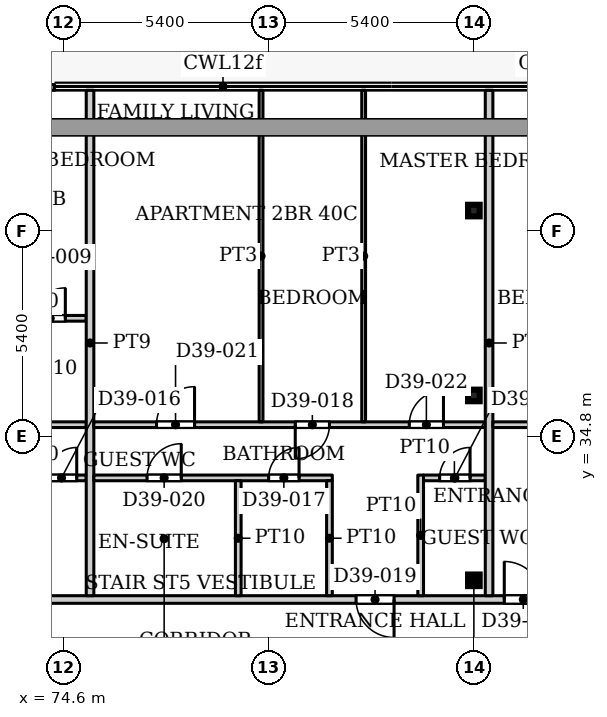
"""IFC4 building model, lengths in metres.
Left out: names, types, materials, properties, quantities, classifications, styles, units other than length and angle.
Written with IfcOpenShell. Run it as: python <this file> out.ifc"""

import sys

from ifc_helpers import new_model, si_unit, direction, frame, frame_2d, origin, origin_2d, place, context, subcontext, project, spatial, rectangle, hollow_rectangle, extrude, source, transform, mapped, element, fill, save


model = new_model("IFC4")
c1 = context("Model", 3, precision=1e-05, world=origin(), true_north=direction((0.0, 1.0)))
c2 = subcontext(c1, "Body", "Model", "MODEL_VIEW")
j1 = project(units=[si_unit("LENGTHUNIT", "METRE"), si_unit("PLANEANGLEUNIT", "RADIAN")], contexts=[c1])
p1 = place(None, origin())
s1 = spatial("IfcSite", under=j1, at=p1, CompositionType="ELEMENT")
p2 = place(p1, origin())
s2 = spatial("IfcBuilding", under=s1, at=p2, CompositionType="ELEMENT")
p3 = place(p2, frame((0.0, 0.0, 172.1)))
s3 = spatial("IfcBuildingStorey", under=s2, at=p3, CompositionType="ELEMENT", Elevation=172.1)
for number, where, z_axis, x_axis in (
    (1, (85.4, 31.005, 0.0), (0.0, 0.0, 1.0), (1.0, 0.0, 0.0)),
    (2, (85.4, 35.87, 0.0), (0.0, 0.0, 1.0), (1.0, 0.0, 0.0)),
    (3, (85.4, 40.735, 0.0), (0.0, 0.0, 1.0), (1.0, 0.0, 0.0)),
):
    element("IfcColumn", number, at=place(p3, frame(where, z_axis=z_axis, x_axis=x_axis)), inside=s3, PredefinedType="COLUMN", context=c2, shape_type="SweptSolid", body=[
        extrude(hollow_rectangle(XDim=0.305, YDim=0.305, WallThickness=0.016, InnerFilletRadius=0.016, OuterFilletRadius=0.032, at=origin_2d()), origin(), (0.0, 0.0, 1.0), 3.9),
    ])
p4 = place(p3, frame((71.965, 43.975, 0.0), z_axis=(0.0, 0.0, 1.0), x_axis=(1.0, 0.0, 0.0)))
e4 = element("IfcWall", 4, at=p4, inside=s3, PredefinedType="SOLIDWALL", context=c2, shape_type="SweptSolid", body=[
    extrude(rectangle(XDim=2.4, YDim=0.15, at=frame_2d((1.2, 0.0))), origin(), (0.0, 0.0, 1.0), 3.75),
])
p5 = place(p4, frame((0.3, 0.0, 0.0)))
e5 = element("IfcOpeningElement", 5, at=p5, cuts=e4, PredefinedType="OPENING", context=c2, shape_type="SweptSolid", body=[
    extrude(rectangle(XDim=1.8, YDim=2.4, at=frame_2d((0.9, 1.2))), frame((0.0, 0.085, 0.0), z_axis=(0.0, -1.0, 0.0), x_axis=(1.0, 0.0, 0.0)), (0.0, 0.0, 1.0), 0.17),
])
p6 = place(p3, frame((53.549, 30.5, 0.0), z_axis=(0.0, 0.0, 1.0), x_axis=(1.0, 0.0, 0.0)))
e6 = element("IfcWall", 6, at=p6, inside=s3, PredefinedType="PARTITIONING", context=c2, shape_type="SweptSolid", body=[
    extrude(rectangle(XDim=39.151, YDim=0.2, at=frame_2d((19.575, 0.0))), origin(), (0.0, 0.0, 1.0), 3.6),
])
p7 = place(p6, frame((2.801, 0.0, 0.0)))
e7 = element("IfcOpeningElement", 7, at=p7, cuts=e6, PredefinedType="OPENING", context=c2, shape_type="SweptSolid", body=[
    extrude(rectangle(XDim=1.0, YDim=2.1, at=frame_2d((0.5, 1.05))), frame((0.0, 0.11, 0.0), z_axis=(0.0, -1.0, 0.0), x_axis=(1.0, 0.0, 0.0)), (0.0, 0.0, 1.0), 0.22),
])
p8 = place(p6, frame((9.851, 0.0, 0.0)))
e8 = element("IfcOpeningElement", 8, at=p8, cuts=e6, PredefinedType="OPENING", context=c2, shape_type="SweptSolid", body=[
    extrude(rectangle(XDim=1.0, YDim=2.1, at=frame_2d((0.5, 1.05))), frame((0.0, 0.11, 0.0), z_axis=(0.0, -1.0, 0.0), x_axis=(1.0, 0.0, 0.0)), (0.0, 0.0, 1.0), 0.22),
])
p9 = place(p6, frame((28.751, 0.0, 0.0)))
e9 = element("IfcOpeningElement", 9, at=p9, cuts=e6, PredefinedType="OPENING", context=c2, shape_type="SweptSolid", body=[
    extrude(rectangle(XDim=1.0, YDim=2.1, at=frame_2d((0.5, 1.05))), frame((0.0, 0.11, 0.0), z_axis=(0.0, -1.0, 0.0), x_axis=(1.0, 0.0, 0.0)), (0.0, 0.0, 1.0), 0.22),
])
p10 = place(p6, frame((32.651, 0.0, 0.0)))
e10 = element("IfcOpeningElement", 10, at=p10, cuts=e6, PredefinedType="OPENING", context=c2, shape_type="SweptSolid", body=[
    extrude(rectangle(XDim=1.0, YDim=2.1, at=frame_2d((0.5, 1.05))), frame((0.0, 0.11, 0.0), z_axis=(0.0, -1.0, 0.0), x_axis=(1.0, 0.0, 0.0)), (0.0, 0.0, 1.0), 0.22),
])
p11 = place(p3, frame((63.1, 35.1, 0.0), z_axis=(0.0, 0.0, 1.0), x_axis=(1.0, 0.0, 0.0)))
e11 = element("IfcWall", 11, at=p11, inside=s3, PredefinedType="PARTITIONING", context=c2, shape_type="SweptSolid", body=[
    extrude(rectangle(XDim=12.1, YDim=0.15, at=frame_2d((6.05, 0.0))), origin(), (0.0, 0.0, 1.0), 3.6),
])
p12 = place(p11, frame((1.1, 0.0, 0.0)))
e12 = element("IfcOpeningElement", 12, at=p12, cuts=e11, PredefinedType="OPENING", context=c2, shape_type="SweptSolid", body=[
    extrude(rectangle(XDim=0.9, YDim=2.1, at=frame_2d((0.45, 1.05))), frame((0.0, 0.085, 0.0), z_axis=(0.0, -1.0, 0.0), x_axis=(1.0, 0.0, 0.0)), (0.0, 0.0, 1.0), 0.17),
])
p13 = place(p11, frame((5.1, 0.0, 0.0)))
e13 = element("IfcOpeningElement", 13, at=p13, cuts=e11, PredefinedType="OPENING", context=c2, shape_type="SweptSolid", body=[
    extrude(rectangle(XDim=1.0, YDim=2.1, at=frame_2d((0.5, 1.05))), frame((0.0, 0.085, 0.0), z_axis=(0.0, -1.0, 0.0), x_axis=(1.0, 0.0, 0.0)), (0.0, 0.0, 1.0), 0.17),
])
p14 = place(p11, frame((8.6, 0.0, 0.0)))
e14 = element("IfcOpeningElement", 14, at=p14, cuts=e11, PredefinedType="OPENING", context=c2, shape_type="SweptSolid", body=[
    extrude(rectangle(XDim=0.9, YDim=2.1, at=frame_2d((0.45, 1.05))), frame((0.0, 0.085, 0.0), z_axis=(0.0, -1.0, 0.0), x_axis=(1.0, 0.0, 0.0)), (0.0, 0.0, 1.0), 0.17),
])
p15 = place(p3, frame((64.725, 33.7, 0.0), z_axis=(0.0, 0.0, 1.0), x_axis=(1.0, 0.0, 0.0)))
e15 = element("IfcWall", 15, at=p15, inside=s3, PredefinedType="PARTITIONING", context=c2, shape_type="SweptSolid", body=[
    extrude(rectangle(XDim=10.475, YDim=0.15, at=frame_2d((5.237, 0.0))), origin(), (0.0, 0.0, 1.0), 3.6),
])
p16 = place(p15, frame((0.725, 0.0, 0.0)))
e16 = element("IfcOpeningElement", 16, at=p16, cuts=e15, PredefinedType="OPENING", context=c2, shape_type="SweptSolid", body=[
    extrude(rectangle(XDim=0.8, YDim=2.1, at=frame_2d((0.4, 1.05))), frame((0.0, 0.085, 0.0), z_axis=(0.0, -1.0, 0.0), x_axis=(1.0, 0.0, 0.0)), (0.0, 0.0, 1.0), 0.17),
])
p17 = place(p15, frame((7.125, 0.0, 0.0)))
e17 = element("IfcOpeningElement", 17, at=p17, cuts=e15, PredefinedType="OPENING", context=c2, shape_type="SweptSolid", body=[
    extrude(rectangle(XDim=0.9, YDim=2.1, at=frame_2d((0.45, 1.05))), frame((0.0, 0.085, 0.0), z_axis=(0.0, -1.0, 0.0), x_axis=(1.0, 0.0, 0.0)), (0.0, 0.0, 1.0), 0.17),
])
p18 = place(p15, frame((4.725, 0.0, 0.0)))
e18 = element("IfcOpeningElement", 18, at=p18, cuts=e15, PredefinedType="OPENING", context=c2, shape_type="SweptSolid", body=[
    extrude(rectangle(XDim=0.8, YDim=2.1, at=frame_2d((0.4, 1.05))), frame((0.0, 0.085, 0.0), z_axis=(0.0, -1.0, 0.0), x_axis=(1.0, 0.0, 0.0)), (0.0, 0.0, 1.0), 0.17),
])
p19 = place(p15, frame((2.675, 0.0, 0.0)))
e19 = element("IfcOpeningElement", 19, at=p19, cuts=e15, PredefinedType="OPENING", context=c2, shape_type="SweptSolid", body=[
    extrude(rectangle(XDim=0.8, YDim=2.1, at=frame_2d((0.4, 1.05))), frame((0.0, 0.085, 0.0), z_axis=(0.0, -1.0, 0.0), x_axis=(1.0, 0.0, 0.0)), (0.0, 0.0, 1.0), 0.17),
])
p20 = place(p15, frame((9.425, 0.0, 0.0)))
e20 = element("IfcOpeningElement", 20, at=p20, cuts=e15, PredefinedType="OPENING", context=c2, shape_type="SweptSolid", body=[
    extrude(rectangle(XDim=0.8, YDim=2.1, at=frame_2d((0.4, 1.05))), frame((0.0, 0.085, 0.0), z_axis=(0.0, -1.0, 0.0), x_axis=(1.0, 0.0, 0.0)), (0.0, 0.0, 1.0), 0.17),
])
p21 = place(p3, frame((73.275, 37.9, 0.0), z_axis=(0.0, 0.0, 1.0), x_axis=(1.0, 0.0, 0.0)))
e21 = element("IfcWall", 21, at=p21, inside=s3, PredefinedType="PARTITIONING", context=c2, shape_type="SweptSolid", body=[
    extrude(rectangle(XDim=1.925, YDim=0.15, at=frame_2d((0.962, 0.0))), origin(), (0.0, 0.0, 1.0), 3.6),
])
p22 = place(p21, frame((0.575, 0.0, 0.0)))
e22 = element("IfcOpeningElement", 22, at=p22, cuts=e21, PredefinedType="OPENING", context=c2, shape_type="SweptSolid", body=[
    extrude(rectangle(XDim=0.8, YDim=2.1, at=frame_2d((0.4, 1.05))), frame((0.0, 0.085, 0.0), z_axis=(0.0, -1.0, 0.0), x_axis=(1.0, 0.0, 0.0)), (0.0, 0.0, 1.0), 0.17),
])
p23 = place(p3, frame((75.3, 30.6, 0.0), z_axis=(0.0, 0.0, 1.0), x_axis=(0.0, 1.0, 0.0)))
e23 = element("IfcWall", 23, at=p23, inside=s3, PredefinedType="PARTITIONING", context=c2, shape_type="SweptSolid", body=[
    extrude(rectangle(XDim=13.3, YDim=0.2, at=frame_2d((6.65, 0.0))), origin(), (0.0, 0.0, 1.0), 3.6),
])
p24 = place(p3, frame((75.4, 33.7, 0.0), z_axis=(0.0, 0.0, 1.0), x_axis=(1.0, 0.0, 0.0)))
e24 = element("IfcWall", 24, at=p24, inside=s3, PredefinedType="PARTITIONING", context=c2, shape_type="SweptSolid", body=[
    extrude(rectangle(XDim=6.275, YDim=0.15, at=frame_2d((3.138, 0.0))), origin(), (0.0, 0.0, 1.0), 3.6),
])
p25 = place(p24, frame((4.6, 0.0, 0.0)))
e25 = element("IfcOpeningElement", 25, at=p25, cuts=e24, PredefinedType="OPENING", context=c2, shape_type="SweptSolid", body=[
    extrude(rectangle(XDim=0.8, YDim=2.1, at=frame_2d((0.4, 1.05))), frame((0.0, 0.085, 0.0), z_axis=(0.0, -1.0, 0.0), x_axis=(1.0, 0.0, 0.0)), (0.0, 0.0, 1.0), 0.17),
])
p26 = place(p24, frame((1.4, 0.0, 0.0)))
e26 = element("IfcOpeningElement", 26, at=p26, cuts=e24, PredefinedType="OPENING", context=c2, shape_type="SweptSolid", body=[
    extrude(rectangle(XDim=0.9, YDim=2.1, at=frame_2d((0.45, 1.05))), frame((0.0, 0.085, 0.0), z_axis=(0.0, -1.0, 0.0), x_axis=(1.0, 0.0, 0.0)), (0.0, 0.0, 1.0), 0.17),
])
p27 = place(p3, frame((75.4, 35.1, 0.0), z_axis=(0.0, 0.0, 1.0), x_axis=(1.0, 0.0, 0.0)))
e27 = element("IfcWall", 27, at=p27, inside=s3, PredefinedType="PARTITIONING", context=c2, shape_type="SweptSolid", body=[
    extrude(rectangle(XDim=10.3, YDim=0.15, at=frame_2d((5.15, 0.0))), origin(), (0.0, 0.0, 1.0), 3.6),
])
p28 = place(p27, frame((5.3, 0.0, 0.0)))
e28 = element("IfcOpeningElement", 28, at=p28, cuts=e27, PredefinedType="OPENING", context=c2, shape_type="SweptSolid", body=[
    extrude(rectangle(XDim=0.9, YDim=2.1, at=frame_2d((0.45, 1.05))), frame((0.0, 0.085, 0.0), z_axis=(0.0, -1.0, 0.0), x_axis=(1.0, 0.0, 0.0)), (0.0, 0.0, 1.0), 0.17),
])
p29 = place(p27, frame((1.65, 0.0, 0.0)))
e29 = element("IfcOpeningElement", 29, at=p29, cuts=e27, PredefinedType="OPENING", context=c2, shape_type="SweptSolid", body=[
    extrude(rectangle(XDim=1.0, YDim=2.1, at=frame_2d((0.5, 1.05))), frame((0.0, 0.085, 0.0), z_axis=(0.0, -1.0, 0.0), x_axis=(1.0, 0.0, 0.0)), (0.0, 0.0, 1.0), 0.17),
])
p30 = place(p27, frame((8.3, 0.0, 0.0)))
e30 = element("IfcOpeningElement", 30, at=p30, cuts=e27, PredefinedType="OPENING", context=c2, shape_type="SweptSolid", body=[
    extrude(rectangle(XDim=0.9, YDim=2.1, at=frame_2d((0.45, 1.05))), frame((0.0, 0.085, 0.0), z_axis=(0.0, -1.0, 0.0), x_axis=(1.0, 0.0, 0.0)), (0.0, 0.0, 1.0), 0.17),
])
p31 = place(p3, frame((79.2, 30.6, 0.0), z_axis=(0.0, 0.0, 1.0), x_axis=(0.0, 1.0, 0.0)))
e31 = element("IfcWall", 31, at=p31, inside=s3, PredefinedType="PARTITIONING", context=c2, shape_type="SweptSolid", body=[
    extrude(rectangle(XDim=3.025, YDim=0.15, at=frame_2d((1.512, 0.0))), origin(), (0.0, 0.0, 1.0), 3.6),
])
p32 = place(p3, frame((79.8, 35.175, 0.0), z_axis=(0.0, 0.0, 1.0), x_axis=(0.0, 1.0, 0.0)))
e32 = element("IfcWall", 32, at=p32, inside=s3, PredefinedType="PARTITIONING", context=c2, shape_type="SweptSolid", body=[
    extrude(rectangle(XDim=8.725, YDim=0.1, at=frame_2d((4.362, 0.0))), origin(), (0.0, 0.0, 1.0), 3.6),
])
p33 = place(p3, frame((81.6, 30.6, 0.0), z_axis=(0.0, 0.0, 1.0), x_axis=(0.0, 1.0, 0.0)))
e33 = element("IfcWall", 33, at=p33, inside=s3, PredefinedType="PARTITIONING", context=c2, shape_type="SweptSolid", body=[
    extrude(rectangle(XDim=3.025, YDim=0.15, at=frame_2d((1.512, 0.0))), origin(), (0.0, 0.0, 1.0), 3.6),
])
p34 = place(p3, frame((82.5, 35.175, 0.0), z_axis=(0.0, 0.0, 1.0), x_axis=(0.0, 1.0, 0.0)))
e34 = element("IfcWall", 34, at=p34, inside=s3, PredefinedType="PARTITIONING", context=c2, shape_type="SweptSolid", body=[
    extrude(rectangle(XDim=8.725, YDim=0.1, at=frame_2d((4.362, 0.0))), origin(), (0.0, 0.0, 1.0), 3.6),
])
p35 = place(p3, frame((84.0, 30.6, 0.0), z_axis=(0.0, 0.0, 1.0), x_axis=(0.0, 1.0, 0.0)))
e35 = element("IfcWall", 35, at=p35, inside=s3, PredefinedType="PARTITIONING", context=c2, shape_type="SweptSolid", body=[
    extrude(rectangle(XDim=3.175, YDim=0.15, at=frame_2d((1.587, 0.0))), origin(), (0.0, 0.0, 1.0), 3.6),
])
p36 = place(p3, frame((84.075, 33.7, 0.0), z_axis=(0.0, 0.0, 1.0), x_axis=(1.0, 0.0, 0.0)))
e36 = element("IfcWall", 36, at=p36, inside=s3, PredefinedType="PARTITIONING", context=c2, shape_type="SweptSolid", body=[
    extrude(rectangle(XDim=1.625, YDim=0.15, at=frame_2d((0.812, 0.0))), origin(), (0.0, 0.0, 1.0), 3.6),
])
p37 = place(p36, frame((0.425, 0.0, 0.0)))
e37 = element("IfcOpeningElement", 37, at=p37, cuts=e36, PredefinedType="OPENING", context=c2, shape_type="SweptSolid", body=[
    extrude(rectangle(XDim=0.8, YDim=2.1, at=frame_2d((0.4, 1.05))), frame((0.0, 0.085, 0.0), z_axis=(0.0, -1.0, 0.0), x_axis=(1.0, 0.0, 0.0)), (0.0, 0.0, 1.0), 0.17),
])
p38 = place(p3, frame((85.8, 30.6, 0.0), z_axis=(0.0, 0.0, 1.0), x_axis=(0.0, 1.0, 0.0)))
e38 = element("IfcWall", 38, at=p38, inside=s3, PredefinedType="PARTITIONING", context=c2, shape_type="SweptSolid", body=[
    extrude(rectangle(XDim=13.3, YDim=0.2, at=frame_2d((6.65, 0.0))), origin(), (0.0, 0.0, 1.0), 3.6),
])
p39 = place(p3, frame((85.9, 35.1, 0.0), z_axis=(0.0, 0.0, 1.0), x_axis=(1.0, 0.0, 0.0)))
e39 = element("IfcWall", 39, at=p39, inside=s3, PredefinedType="PARTITIONING", context=c2, shape_type="SweptSolid", body=[
    extrude(rectangle(XDim=8.6, YDim=0.15, at=frame_2d((4.3, 0.0))), origin(), (0.0, 0.0, 1.0), 3.6),
])
p40 = place(p39, frame((1.1, 0.0, 0.0)))
e40 = element("IfcOpeningElement", 40, at=p40, cuts=e39, PredefinedType="OPENING", context=c2, shape_type="SweptSolid", body=[
    extrude(rectangle(XDim=0.9, YDim=2.1, at=frame_2d((0.45, 1.05))), frame((0.0, 0.085, 0.0), z_axis=(0.0, -1.0, 0.0), x_axis=(1.0, 0.0, 0.0)), (0.0, 0.0, 1.0), 0.17),
])
p41 = place(p39, frame((5.4, 0.0, 0.0)))
e41 = element("IfcOpeningElement", 41, at=p41, cuts=e39, PredefinedType="OPENING", context=c2, shape_type="SweptSolid", body=[
    extrude(rectangle(XDim=1.0, YDim=2.1, at=frame_2d((0.5, 1.05))), frame((0.0, 0.085, 0.0), z_axis=(0.0, -1.0, 0.0), x_axis=(1.0, 0.0, 0.0)), (0.0, 0.0, 1.0), 0.17),
])
m1 = source(origin(), c2, "Body", "SweptSolid", [
    extrude(rectangle(XDim=0.8, YDim=2.1, at=frame_2d((0.4, 1.05))), frame((0.0, 0.025, 0.0), z_axis=(0.0, -1.0, 0.0), x_axis=(1.0, 0.0, 0.0)), (0.0, 0.0, 1.0), 0.05),
])
p42 = place(p22, origin())
e42 = element("IfcDoor", 42, at=p42, inside=s3, OperationType="SINGLE_SWING_LEFT", PredefinedType="DOOR", context=c2, shape_type="MappedRepresentation", body=[
    mapped(m1, transform((0.0, 0.0, 0.0), x_axis=(1.0, 0.0, 0.0), y_axis=(0.0, 1.0, 0.0), z_axis=(0.0, 0.0, 1.0), scale=1.0)),
])
fill(e22, e42)
p43 = place(p20, origin())
e43 = element("IfcDoor", 43, at=p43, inside=s3, OperationType="SINGLE_SWING_LEFT", PredefinedType="DOOR", context=c2, shape_type="MappedRepresentation", body=[
    mapped(m1, transform((0.0, 0.0, 0.0), x_axis=(1.0, 0.0, 0.0), y_axis=(0.0, 1.0, 0.0), z_axis=(0.0, 0.0, 1.0), scale=1.0)),
])
fill(e20, e43)
p44 = place(p25, origin())
e44 = element("IfcDoor", 44, at=p44, inside=s3, OperationType="SINGLE_SWING_LEFT", PredefinedType="DOOR", context=c2, shape_type="MappedRepresentation", body=[
    mapped(m1, transform((0.0, 0.0, 0.0), x_axis=(1.0, 0.0, 0.0), y_axis=(0.0, 1.0, 0.0), z_axis=(0.0, 0.0, 1.0), scale=1.0)),
])
fill(e25, e44)
m2 = source(origin(), c2, "Body", "SweptSolid", [
    extrude(rectangle(XDim=0.9, YDim=2.1, at=frame_2d((0.45, 1.05))), frame((0.0, 0.025, 0.0), z_axis=(0.0, -1.0, 0.0), x_axis=(1.0, 0.0, 0.0)), (0.0, 0.0, 1.0), 0.05),
])
p45 = place(p28, origin())
e45 = element("IfcDoor", 45, at=p45, inside=s3, OperationType="SINGLE_SWING_RIGHT", PredefinedType="DOOR", context=c2, shape_type="MappedRepresentation", body=[
    mapped(m2, transform((0.0, 0.0, 0.0), x_axis=(1.0, 0.0, 0.0), y_axis=(0.0, 1.0, 0.0), z_axis=(0.0, 0.0, 1.0), scale=1.0)),
])
fill(e28, e45)
m3 = source(origin(), c2, "Body", "SweptSolid", [
    extrude(rectangle(XDim=1.0, YDim=2.1, at=frame_2d((0.5, 1.05))), frame((0.0, 0.025, 0.0), z_axis=(0.0, -1.0, 0.0), x_axis=(1.0, 0.0, 0.0)), (0.0, 0.0, 1.0), 0.05),
])
p46 = place(p9, origin())
e46 = element("IfcDoor", 46, at=p46, inside=s3, OperationType="SINGLE_SWING_RIGHT", PredefinedType="DOOR", context=c2, shape_type="MappedRepresentation", body=[
    mapped(m3, transform((0.0, 0.0, 0.0), x_axis=(1.0, 0.0, 0.0), y_axis=(0.0, 1.0, 0.0), z_axis=(0.0, 0.0, 1.0), scale=1.0)),
])
fill(e9, e46)
p47 = place(p26, origin())
e47 = element("IfcDoor", 47, at=p47, inside=s3, OperationType="SINGLE_SWING_LEFT", PredefinedType="DOOR", context=c2, shape_type="MappedRepresentation", body=[
    mapped(m2, transform((0.0, 0.0, 0.0), x_axis=(1.0, 0.0, 0.0), y_axis=(0.0, 1.0, 0.0), z_axis=(0.0, 0.0, 1.0), scale=1.0)),
])
fill(e26, e47)
m4 = source(origin(), c2, "Body", "SweptSolid", [
    extrude(rectangle(XDim=1.0, YDim=2.1, at=frame_2d((0.5, 1.05))), frame((0.0, 0.025, 0.0), z_axis=(0.0, -1.0, 0.0), x_axis=(1.0, 0.0, 0.0)), (0.0, 0.0, 1.0), 0.05),
])
p48 = place(p29, origin())
e48 = element("IfcDoor", 48, at=p48, inside=s3, OperationType="SINGLE_SWING_LEFT", PredefinedType="DOOR", context=c2, shape_type="MappedRepresentation", body=[
    mapped(m4, transform((0.0, 0.0, 0.0), x_axis=(1.0, 0.0, 0.0), y_axis=(0.0, 1.0, 0.0), z_axis=(0.0, 0.0, 1.0), scale=1.0)),
])
fill(e29, e48)
p49 = place(p30, origin())
e49 = element("IfcDoor", 49, at=p49, inside=s3, OperationType="SINGLE_SWING_LEFT", PredefinedType="DOOR", context=c2, shape_type="MappedRepresentation", body=[
    mapped(m2, transform((0.0, 0.0, 0.0), x_axis=(1.0, 0.0, 0.0), y_axis=(0.0, 1.0, 0.0), z_axis=(0.0, 0.0, 1.0), scale=1.0)),
])
fill(e30, e49)
p50 = place(p37, origin())
e50 = element("IfcDoor", 50, at=p50, inside=s3, OperationType="SINGLE_SWING_LEFT", PredefinedType="DOOR", context=c2, shape_type="MappedRepresentation", body=[
    mapped(m1, transform((0.0, 0.0, 0.0), x_axis=(1.0, 0.0, 0.0), y_axis=(0.0, 1.0, 0.0), z_axis=(0.0, 0.0, 1.0), scale=1.0)),
])
fill(e37, e50)
p51 = place(p10, origin())
e51 = element("IfcDoor", 51, at=p51, inside=s3, OperationType="SINGLE_SWING_LEFT", PredefinedType="DOOR", context=c2, shape_type="MappedRepresentation", body=[
    mapped(m3, transform((0.0, 0.0, 0.0), x_axis=(1.0, 0.0, 0.0), y_axis=(0.0, 1.0, 0.0), z_axis=(0.0, 0.0, 1.0), scale=1.0)),
])
fill(e10, e51)
save(model, sys.argv[1])
